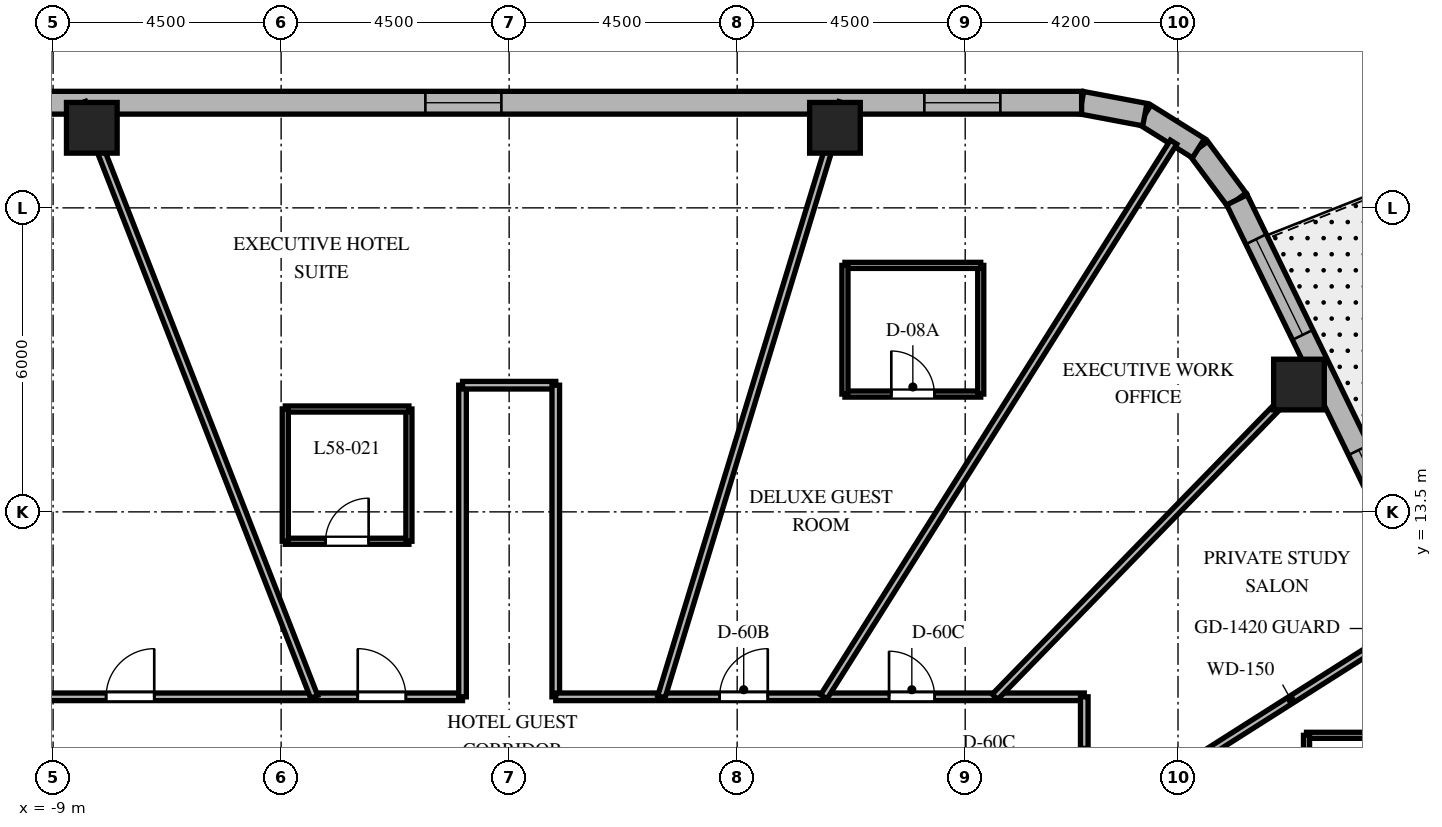
"""IFC4 building model, lengths in metres.
Left out: names, types, materials, properties, quantities, classifications, styles, units other than length and angle.
Written with IfcOpenShell. Run it as: python <this file> out.ifc"""

import sys

from ifc_helpers import new_model, si_unit, direction, frame, frame_2d, origin, origin_2d, place, context, subcontext, project, spatial, rectangle, extrude, element, fill, save


model = new_model("IFC4")
c1 = context("Model", 3, precision=1e-05, world=origin(), true_north=direction((0.0, 1.0)))
c2 = subcontext(c1, "Body", "Model", "MODEL_VIEW")
j1 = project(units=[si_unit("LENGTHUNIT", "METRE"), si_unit("PLANEANGLEUNIT", "RADIAN")], contexts=[c1])
p1 = place(None, origin())
s1 = spatial("IfcSite", under=j1, at=p1, CompositionType="ELEMENT")
p2 = place(p1, origin())
s2 = spatial("IfcBuilding", under=s1, at=p2, CompositionType="ELEMENT")
p3 = place(p2, frame((0.0, 0.0, 233.1)))
s3 = spatial("IfcBuildingStorey", under=s2, at=p3, CompositionType="ELEMENT", Elevation=233.1)
for number, where, z_axis, x_axis in (
    (1, (15.587, 16.013, 0.0), (0.0, 0.0, 1.0), (1.0, 0.0, 0.0)),
    (2, (6.43, 21.08, 0.0), (0.0, 0.0, 1.0), (1.0, 0.0, 0.0)),
    (3, (-8.236, 21.08, 0.0), (0.0, 0.0, 1.0), (1.0, 0.0, 0.0)),
):
    element("IfcColumn", number, at=place(p3, frame(where, z_axis=z_axis, x_axis=x_axis)), inside=s3, PredefinedType="COLUMN", context=c2, shape_type="SweptSolid", body=[
        extrude(rectangle(XDim=1.0, YDim=1.0, at=origin_2d()), origin(), (0.0, 0.0, 1.0), 3.8),
    ])
p4 = place(p3, frame((14.362, 19.658, 0.0), z_axis=(0.0, 0.0, 1.0), x_axis=(-0.596642462792, 0.80250717853, 0.0)))
e4 = element("IfcWall", 4, at=p4, inside=s3, PredefinedType="SOLIDWALL", context=c2, shape_type="SweptSolid", body=[
    extrude(rectangle(XDim=1.27, YDim=0.45, at=frame_2d((0.635, 0.0))), origin(), (0.0, 0.0, 1.0), 3.5),
])
p5 = place(p3, frame((13.604, 20.678, 0.0), z_axis=(0.0, 0.0, 1.0), x_axis=(-0.847910404124, 0.53013955387, 0.0)))
e5 = element("IfcWall", 5, at=p5, inside=s3, PredefinedType="SOLIDWALL", context=c2, shape_type="SweptSolid", body=[
    extrude(rectangle(XDim=1.249, YDim=0.45, at=frame_2d((0.624, 0.0))), origin(), (0.0, 0.0, 1.0), 3.5),
])
p6 = place(p3, frame((12.546, 21.34, 0.0), z_axis=(0.0, 0.0, 1.0), x_axis=(-0.982686750835, 0.18527479519, 0.0)))
e6 = element("IfcWall", 6, at=p6, inside=s3, PredefinedType="SOLIDWALL", context=c2, shape_type="SweptSolid", body=[
    extrude(rectangle(XDim=1.27, YDim=0.45, at=frame_2d((0.635, 0.0))), origin(), (0.0, 0.0, 1.0), 3.5),
])
p7 = place(p3, frame((22.74, 2.452, 0.0), z_axis=(0.0, 0.0, 1.0), x_axis=(-0.437753424814, 0.899095066755, 0.0)))
e7 = element("IfcWall", 7, at=p7, inside=s3, PredefinedType="SOLIDWALL", context=c2, shape_type="SweptSolid", body=[
    extrude(rectangle(XDim=19.137, YDim=0.45, at=frame_2d((9.569, 0.0))), origin(), (0.0, 0.0, 1.0), 3.5),
])
p8 = place(p7, frame((4.763, 0.0, 0.0)))
e8 = element("IfcOpeningElement", 8, at=p8, cuts=e7, PredefinedType="OPENING", context=c2, shape_type="SweptSolid", body=[
    extrude(rectangle(XDim=1.0, YDim=2.15, at=frame_2d((0.5, 1.075))), frame((0.0, 0.235, 0.0), z_axis=(0.0, -1.0, 0.0), x_axis=(1.0, 0.0, 0.0)), (0.0, 0.0, 1.0), 0.47),
])
p9 = place(p7, frame((6.851, 0.0, 0.8)))
e9 = element("IfcOpeningElement", 9, at=p9, cuts=e7, PredefinedType="OPENING", context=c2, shape_type="SweptSolid", body=[
    extrude(rectangle(XDim=2.1, YDim=1.85, at=frame_2d((1.05, 0.925))), frame((0.0, 0.235, 0.0), z_axis=(0.0, -1.0, 0.0), x_axis=(1.0, 0.0, 0.0)), (0.0, 0.0, 1.0), 0.47),
])
p10 = place(p7, frame((11.545, 0.0, 0.8)))
e10 = element("IfcOpeningElement", 10, at=p10, cuts=e7, PredefinedType="OPENING", context=c2, shape_type="SweptSolid", body=[
    extrude(rectangle(XDim=2.1, YDim=1.85, at=frame_2d((1.05, 0.925))), frame((0.0, 0.235, 0.0), z_axis=(0.0, -1.0, 0.0), x_axis=(1.0, 0.0, 0.0)), (0.0, 0.0, 1.0), 0.47),
])
p11 = place(p7, frame((16.173, 0.0, 0.8)))
e11 = element("IfcOpeningElement", 11, at=p11, cuts=e7, PredefinedType="OPENING", context=c2, shape_type="SweptSolid", body=[
    extrude(rectangle(XDim=2.1, YDim=1.85, at=frame_2d((1.05, 0.925))), frame((0.0, 0.235, 0.0), z_axis=(0.0, -1.0, 0.0), x_axis=(1.0, 0.0, 0.0)), (0.0, 0.0, 1.0), 0.47),
])
p12 = place(p7, frame((0.916, 0.0, 0.8)))
e12 = element("IfcOpeningElement", 12, at=p12, cuts=e7, PredefinedType="OPENING", context=c2, shape_type="SweptSolid", body=[
    extrude(rectangle(XDim=2.1, YDim=1.85, at=frame_2d((1.05, 0.925))), frame((0.0, 0.235, 0.0), z_axis=(0.0, -1.0, 0.0), x_axis=(1.0, 0.0, 0.0)), (0.0, 0.0, 1.0), 0.47),
])
p13 = place(p3, frame((11.298, 21.575, 0.0), z_axis=(0.0, 0.0, 1.0), x_axis=(-1.0, 0.0, 0.0)))
e13 = element("IfcWall", 13, at=p13, inside=s3, PredefinedType="SOLIDWALL", context=c2, shape_type="SweptSolid", body=[
    extrude(rectangle(XDim=24.399, YDim=0.45, at=frame_2d((12.2, 0.0))), origin(), (0.0, 0.0, 1.0), 3.5),
])
p14 = place(p13, frame((1.604, 0.0, 0.8)))
e14 = element("IfcOpeningElement", 14, at=p14, cuts=e13, PredefinedType="OPENING", context=c2, shape_type="SweptSolid", body=[
    extrude(rectangle(XDim=1.5, YDim=1.8, at=frame_2d((0.75, 0.9))), frame((0.0, 0.235, 0.0), z_axis=(0.0, -1.0, 0.0), x_axis=(1.0, 0.0, 0.0)), (0.0, 0.0, 1.0), 0.47),
])
p15 = place(p13, frame((11.451, 0.0, 0.8)))
e15 = element("IfcOpeningElement", 15, at=p15, cuts=e13, PredefinedType="OPENING", context=c2, shape_type="SweptSolid", body=[
    extrude(rectangle(XDim=1.5, YDim=1.8, at=frame_2d((0.75, 0.9))), frame((0.0, 0.235, 0.0), z_axis=(0.0, -1.0, 0.0), x_axis=(1.0, 0.0, 0.0)), (0.0, 0.0, 1.0), 0.47),
])
p16 = place(p13, frame((21.296, 0.0, 0.8)))
e16 = element("IfcOpeningElement", 16, at=p16, cuts=e13, PredefinedType="OPENING", context=c2, shape_type="SweptSolid", body=[
    extrude(rectangle(XDim=1.5, YDim=1.8, at=frame_2d((0.75, 0.9))), frame((0.0, 0.235, 0.0), z_axis=(0.0, -1.0, 0.0), x_axis=(1.0, 0.0, 0.0)), (0.0, 0.0, 1.0), 0.47),
])
p17 = place(p3, frame((-11.35, 9.85, 0.0), z_axis=(0.0, 0.0, 1.0), x_axis=(1.0, 0.0, 0.0)))
e17 = element("IfcWall", 17, at=p17, inside=s3, PredefinedType="PARTITIONING", context=c2, shape_type="SweptSolid", body=[
    extrude(rectangle(XDim=10.43, YDim=0.15, at=frame_2d((5.215, 0.0))), origin(), (0.0, 0.0, 1.0), 2.99),
])
p18 = place(p17, frame((8.362, 0.0, 0.0)))
e18 = element("IfcOpeningElement", 18, at=p18, cuts=e17, PredefinedType="OPENING", context=c2, shape_type="SweptSolid", body=[
    extrude(rectangle(XDim=0.95, YDim=2.03, at=frame_2d((0.475, 1.015))), frame((0.0, 0.085, 0.0), z_axis=(0.0, -1.0, 0.0), x_axis=(1.0, 0.0, 0.0)), (0.0, 0.0, 1.0), 0.17),
])
p19 = place(p17, frame((3.396, 0.0, 0.0)))
e19 = element("IfcOpeningElement", 19, at=p19, cuts=e17, PredefinedType="OPENING", context=c2, shape_type="SweptSolid", body=[
    extrude(rectangle(XDim=0.95, YDim=2.03, at=frame_2d((0.475, 1.015))), frame((0.0, 0.085, 0.0), z_axis=(0.0, -1.0, 0.0), x_axis=(1.0, 0.0, 0.0)), (0.0, 0.0, 1.0), 0.17),
])
p20 = place(p3, frame((-0.92, 9.85, 0.0), z_axis=(0.0, 0.0, 1.0), x_axis=(0.0, 1.0, 0.0)))
e20 = element("IfcWall", 20, at=p20, inside=s3, PredefinedType="PARTITIONING", context=c2, shape_type="SweptSolid", body=[
    extrude(rectangle(XDim=6.15, YDim=0.15, at=frame_2d((3.075, 0.0))), origin(), (0.0, 0.0, 1.0), 3.026),
])
p21 = place(p3, frame((-0.92, 16.0, 0.0), z_axis=(0.0, 0.0, 1.0), x_axis=(1.0, 0.0, 0.0)))
e21 = element("IfcWall", 21, at=p21, inside=s3, PredefinedType="PARTITIONING", context=c2, shape_type="SweptSolid", body=[
    extrude(rectangle(XDim=1.84, YDim=0.15, at=frame_2d((0.92, 0.0))), origin(), (0.0, 0.0, 1.0), 3.5),
])
p22 = place(p3, frame((0.92, 16.0, 0.0), z_axis=(0.0, 0.0, 1.0), x_axis=(0.0, -1.0, 0.0)))
e22 = element("IfcWall", 22, at=p22, inside=s3, PredefinedType="PARTITIONING", context=c2, shape_type="SweptSolid", body=[
    extrude(rectangle(XDim=6.15, YDim=0.15, at=frame_2d((3.075, 0.0))), origin(), (0.0, 0.0, 1.0), 3.026),
])
p23 = place(p3, frame((0.92, 9.85, 0.0), z_axis=(0.0, 0.0, 1.0), x_axis=(1.0, 0.0, 0.0)))
e23 = element("IfcWall", 23, at=p23, inside=s3, PredefinedType="PARTITIONING", context=c2, shape_type="SweptSolid", body=[
    extrude(rectangle(XDim=10.43, YDim=0.15, at=frame_2d((5.215, 0.0))), origin(), (0.0, 0.0, 1.0), 2.99),
])
p24 = place(p23, frame((6.577, 0.0, 0.0)))
e24 = element("IfcOpeningElement", 24, at=p24, cuts=e23, PredefinedType="OPENING", context=c2, shape_type="SweptSolid", body=[
    extrude(rectangle(XDim=0.9, YDim=2.03, at=frame_2d((0.45, 1.015))), frame((0.0, 0.085, 0.0), z_axis=(0.0, -1.0, 0.0), x_axis=(1.0, 0.0, 0.0)), (0.0, 0.0, 1.0), 0.17),
])
p25 = place(p23, frame((3.234, 0.0, 0.0)))
e25 = element("IfcOpeningElement", 25, at=p25, cuts=e23, PredefinedType="OPENING", context=c2, shape_type="SweptSolid", body=[
    extrude(rectangle(XDim=0.95, YDim=2.03, at=frame_2d((0.475, 1.015))), frame((0.0, 0.085, 0.0), z_axis=(0.0, -1.0, 0.0), x_axis=(1.0, 0.0, 0.0)), (0.0, 0.0, 1.0), 0.17),
])
p26 = place(p3, frame((11.35, 9.85, 0.0), z_axis=(0.0, 0.0, 1.0), x_axis=(0.0, -1.0, 0.0)))
e26 = element("IfcWall", 26, at=p26, inside=s3, PredefinedType="PARTITIONING", context=c2, shape_type="SweptSolid", body=[
    extrude(rectangle(XDim=12.4, YDim=0.15, at=frame_2d((6.2, 0.0))), origin(), (0.0, 0.0, 1.0), 2.99),
])
p27 = place(p26, frame((4.191, 0.0, 0.0)))
e27 = element("IfcOpeningElement", 27, at=p27, cuts=e26, PredefinedType="OPENING", context=c2, shape_type="SweptSolid", body=[
    extrude(rectangle(XDim=0.95, YDim=2.03, at=frame_2d((0.475, 1.015))), frame((0.0, 0.085, 0.0), z_axis=(0.0, -1.0, 0.0), x_axis=(1.0, 0.0, 0.0)), (0.0, 0.0, 1.0), 0.17),
])
p28 = place(p26, frame((0.994, 0.0, 0.0)))
e28 = element("IfcOpeningElement", 28, at=p28, cuts=e26, PredefinedType="OPENING", context=c2, shape_type="SweptSolid", body=[
    extrude(rectangle(XDim=0.9, YDim=2.03, at=frame_2d((0.45, 1.015))), frame((0.0, 0.085, 0.0), z_axis=(0.0, -1.0, 0.0), x_axis=(1.0, 0.0, 0.0)), (0.0, 0.0, 1.0), 0.17),
])
p29 = place(p26, frame((8.835, 0.0, 0.0)))
e29 = element("IfcOpeningElement", 29, at=p29, cuts=e26, PredefinedType="OPENING", context=c2, shape_type="SweptSolid", body=[
    extrude(rectangle(XDim=0.95, YDim=2.03, at=frame_2d((0.475, 1.015))), frame((0.0, 0.085, 0.0), z_axis=(0.0, -1.0, 0.0), x_axis=(1.0, 0.0, 0.0)), (0.0, 0.0, 1.0), 0.17),
])
p30 = place(p3, frame((11.35, 7.202, 0.0), z_axis=(0.0, 0.0, 1.0), x_axis=(0.844364592263, 0.535769013039, 0.0)))
e30 = element("IfcWall", 30, at=p30, inside=s3, PredefinedType="PARTITIONING", context=c2, shape_type="SweptSolid", body=[
    extrude(rectangle(XDim=8.213, YDim=0.15, at=frame_2d((4.106, 0.0))), origin(), (0.0, 0.0, 1.0), 2.74),
])
p31 = place(p3, frame((9.588, 9.85, 0.0), z_axis=(0.0, 0.0, 1.0), x_axis=(0.697519469595, 0.716565830567, 0.0)))
e31 = element("IfcWall", 31, at=p31, inside=s3, PredefinedType="PARTITIONING", context=c2, shape_type="SweptSolid", body=[
    extrude(rectangle(XDim=9.126, YDim=0.15, at=frame_2d((4.563, 0.0))), origin(), (0.0, 0.0, 1.0), 2.74),
])
p32 = place(p3, frame((6.21, 9.85, 0.0), z_axis=(0.0, 0.0, 1.0), x_axis=(0.533335553786, 0.84590376939, 0.0)))
e32 = element("IfcWall", 32, at=p32, inside=s3, PredefinedType="PARTITIONING", context=c2, shape_type="SweptSolid", body=[
    extrude(rectangle(XDim=12.941, YDim=0.15, at=frame_2d((6.47, 0.0))), origin(), (0.0, 0.0, 1.0), 2.74),
])
p33 = place(p3, frame((3.004, 9.85, 0.0), z_axis=(0.0, 0.0, 1.0), x_axis=(0.291775760688, 0.956486751333, 0.0)))
e33 = element("IfcWall", 33, at=p33, inside=s3, PredefinedType="PARTITIONING", context=c2, shape_type="SweptSolid", body=[
    extrude(rectangle(XDim=12.258, YDim=0.15, at=frame_2d((6.129, 0.0))), origin(), (0.0, 0.0, 1.0), 2.74),
])
p34 = place(p3, frame((-3.848, 9.85, 0.0), z_axis=(0.0, 0.0, 1.0), x_axis=(-0.363921778212, 0.931429513889, 0.0)))
e34 = element("IfcWall", 34, at=p34, inside=s3, PredefinedType="PARTITIONING", context=c2, shape_type="SweptSolid", body=[
    extrude(rectangle(XDim=12.588, YDim=0.15, at=frame_2d((6.294, 0.0))), origin(), (0.0, 0.0, 1.0), 2.74),
])
p35 = place(p3, frame((18.176, 9.09, 0.0), z_axis=(0.0, 0.0, 1.0), x_axis=(-1.0, 0.0, 0.0)))
e35 = element("IfcWall", 35, at=p35, inside=s3, PredefinedType="PARTITIONING", context=c2, shape_type="SweptSolid", body=[
    extrude(rectangle(XDim=2.44, YDim=0.12, at=frame_2d((1.22, 0.0))), origin(), (0.0, 0.0, 1.0), 3.5),
])
p36 = place(p3, frame((15.736, 9.09, 0.0), z_axis=(0.0, 0.0, 1.0), x_axis=(0.0, -1.0, 0.0)))
e36 = element("IfcWall", 36, at=p36, inside=s3, PredefinedType="PARTITIONING", context=c2, shape_type="SweptSolid", body=[
    extrude(rectangle(XDim=2.61, YDim=0.12, at=frame_2d((1.305, 0.0))), origin(), (0.0, 0.0, 1.0), 2.99),
])
p37 = place(p3, frame((6.627, 15.825, 0.0), z_axis=(0.0, 0.0, 1.0), x_axis=(1.0, 0.0, 0.0)))
e37 = element("IfcWall", 37, at=p37, inside=s3, PredefinedType="PARTITIONING", context=c2, shape_type="SweptSolid", body=[
    extrude(rectangle(XDim=2.68, YDim=0.12, at=frame_2d((1.34, 0.0))), origin(), (0.0, 0.0, 1.0), 3.072),
])
p38 = place(p37, frame((0.915, 0.0, 0.0)))
e38 = element("IfcOpeningElement", 38, at=p38, cuts=e37, PredefinedType="OPENING", context=c2, shape_type="SweptSolid", body=[
    extrude(rectangle(XDim=0.85, YDim=2.03, at=frame_2d((0.425, 1.015))), frame((0.0, 0.07, 0.0), z_axis=(0.0, -1.0, 0.0), x_axis=(1.0, 0.0, 0.0)), (0.0, 0.0, 1.0), 0.14),
])
p39 = place(p3, frame((9.307, 15.825, 0.0), z_axis=(0.0, 0.0, 1.0), x_axis=(0.0, 1.0, 0.0)))
e39 = element("IfcWall", 39, at=p39, inside=s3, PredefinedType="PARTITIONING", context=c2, shape_type="SweptSolid", body=[
    extrude(rectangle(XDim=2.54, YDim=0.12, at=frame_2d((1.27, 0.0))), origin(), (0.0, 0.0, 1.0), 3.5),
])
p40 = place(p3, frame((9.307, 18.365, 0.0), z_axis=(0.0, 0.0, 1.0), x_axis=(-1.0, 0.0, 0.0)))
e40 = element("IfcWall", 40, at=p40, inside=s3, PredefinedType="PARTITIONING", context=c2, shape_type="SweptSolid", body=[
    extrude(rectangle(XDim=2.68, YDim=0.12, at=frame_2d((1.34, 0.0))), origin(), (0.0, 0.0, 1.0), 3.5),
])
p41 = place(p3, frame((6.627, 18.365, 0.0), z_axis=(0.0, 0.0, 1.0), x_axis=(0.0, -1.0, 0.0)))
e41 = element("IfcWall", 41, at=p41, inside=s3, PredefinedType="PARTITIONING", context=c2, shape_type="SweptSolid", body=[
    extrude(rectangle(XDim=2.54, YDim=0.12, at=frame_2d((1.27, 0.0))), origin(), (0.0, 0.0, 1.0), 3.072),
])
p42 = place(p3, frame((-4.418, 12.92, 0.0), z_axis=(0.0, 0.0, 1.0), x_axis=(1.0, 0.0, 0.0)))
e42 = element("IfcWall", 42, at=p42, inside=s3, PredefinedType="PARTITIONING", context=c2, shape_type="SweptSolid", body=[
    extrude(rectangle(XDim=2.44, YDim=0.12, at=frame_2d((1.22, 0.0))), origin(), (0.0, 0.0, 1.0), 3.5),
])
p43 = place(p42, frame((0.795, 0.0, 0.0)))
e43 = element("IfcOpeningElement", 43, at=p43, cuts=e42, PredefinedType="OPENING", context=c2, shape_type="SweptSolid", body=[
    extrude(rectangle(XDim=0.85, YDim=2.03, at=frame_2d((0.425, 1.015))), frame((0.0, 0.07, 0.0), z_axis=(0.0, -1.0, 0.0), x_axis=(1.0, 0.0, 0.0)), (0.0, 0.0, 1.0), 0.14),
])
p44 = place(p3, frame((-1.978, 12.92, 0.0), z_axis=(0.0, 0.0, 1.0), x_axis=(0.0, 1.0, 0.0)))
e44 = element("IfcWall", 44, at=p44, inside=s3, PredefinedType="PARTITIONING", context=c2, shape_type="SweptSolid", body=[
    extrude(rectangle(XDim=2.61, YDim=0.12, at=frame_2d((1.305, 0.0))), origin(), (0.0, 0.0, 1.0), 3.026),
])
p45 = place(p3, frame((-1.978, 15.53, 0.0), z_axis=(0.0, 0.0, 1.0), x_axis=(-1.0, 0.0, 0.0)))
e45 = element("IfcWall", 45, at=p45, inside=s3, PredefinedType="PARTITIONING", context=c2, shape_type="SweptSolid", body=[
    extrude(rectangle(XDim=2.44, YDim=0.12, at=frame_2d((1.22, 0.0))), origin(), (0.0, 0.0, 1.0), 3.5),
])
p46 = place(p3, frame((-4.418, 15.53, 0.0), z_axis=(0.0, 0.0, 1.0), x_axis=(0.0, -1.0, 0.0)))
e46 = element("IfcWall", 46, at=p46, inside=s3, PredefinedType="PARTITIONING", context=c2, shape_type="SweptSolid", body=[
    extrude(rectangle(XDim=2.61, YDim=0.12, at=frame_2d((1.305, 0.0))), origin(), (0.0, 0.0, 1.0), 3.026),
])
p47 = place(p10, origin())
e47 = element("IfcWindow", 47, at=p47, inside=s3, PartitioningType="SINGLE_PANEL", PredefinedType="WINDOW", context=c2, shape_type="SweptSolid", body=[
    extrude(rectangle(XDim=2.1, YDim=1.85, at=frame_2d((1.05, 0.925))), frame((0.0, 0.03, 0.0), z_axis=(0.0, -1.0, 0.0), x_axis=(1.0, 0.0, 0.0)), (0.0, 0.0, 1.0), 0.06),
])
fill(e10, e47)
p48 = place(p11, origin())
e48 = element("IfcWindow", 48, at=p48, inside=s3, PartitioningType="SINGLE_PANEL", PredefinedType="WINDOW", context=c2, shape_type="SweptSolid", body=[
    extrude(rectangle(XDim=2.1, YDim=1.85, at=frame_2d((1.05, 0.925))), frame((0.0, 0.03, 0.0), z_axis=(0.0, -1.0, 0.0), x_axis=(1.0, 0.0, 0.0)), (0.0, 0.0, 1.0), 0.06),
])
fill(e11, e48)
p49 = place(p14, origin())
e49 = element("IfcWindow", 49, at=p49, inside=s3, PartitioningType="SINGLE_PANEL", PredefinedType="WINDOW", context=c2, shape_type="SweptSolid", body=[
    extrude(rectangle(XDim=1.5, YDim=1.8, at=frame_2d((0.75, 0.9))), frame((0.0, 0.03, 0.0), z_axis=(0.0, -1.0, 0.0), x_axis=(1.0, 0.0, 0.0)), (0.0, 0.0, 1.0), 0.06),
])
fill(e14, e49)
p50 = place(p15, origin())
e50 = element("IfcWindow", 50, at=p50, inside=s3, PartitioningType="SINGLE_PANEL", PredefinedType="WINDOW", context=c2, shape_type="SweptSolid", body=[
    extrude(rectangle(XDim=1.5, YDim=1.8, at=frame_2d((0.75, 0.9))), frame((0.0, 0.03, 0.0), z_axis=(0.0, -1.0, 0.0), x_axis=(1.0, 0.0, 0.0)), (0.0, 0.0, 1.0), 0.06),
])
fill(e15, e50)
p51 = place(p28, origin())
e51 = element("IfcDoor", 51, at=p51, inside=s3, OperationType="SINGLE_SWING_RIGHT", PredefinedType="DOOR", context=c2, shape_type="SweptSolid", body=[
    extrude(rectangle(XDim=0.9, YDim=2.03, at=frame_2d((0.45, 1.015))), frame((0.0, 0.025, 0.0), z_axis=(0.0, -1.0, 0.0), x_axis=(1.0, 0.0, 0.0)), (0.0, 0.0, 1.0), 0.05),
])
fill(e28, e51)
p52 = place(p24, origin())
e52 = element("IfcDoor", 52, at=p52, inside=s3, OperationType="SINGLE_SWING_LEFT", PredefinedType="DOOR", context=c2, shape_type="SweptSolid", body=[
    extrude(rectangle(XDim=0.9, YDim=2.03, at=frame_2d((0.45, 1.015))), frame((0.0, 0.025, 0.0), z_axis=(0.0, -1.0, 0.0), x_axis=(1.0, 0.0, 0.0)), (0.0, 0.0, 1.0), 0.05),
])
fill(e24, e52)
p53 = place(p25, origin())
e53 = element("IfcDoor", 53, at=p53, inside=s3, OperationType="SINGLE_SWING_RIGHT", PredefinedType="DOOR", context=c2, shape_type="SweptSolid", body=[
    extrude(rectangle(XDim=0.95, YDim=2.03, at=frame_2d((0.475, 1.015))), frame((0.0, 0.025, 0.0), z_axis=(0.0, -1.0, 0.0), x_axis=(1.0, 0.0, 0.0)), (0.0, 0.0, 1.0), 0.05),
])
fill(e25, e53)
p54 = place(p38, origin())
e54 = element("IfcDoor", 54, at=p54, inside=s3, OperationType="SINGLE_SWING_LEFT", PredefinedType="DOOR", context=c2, shape_type="SweptSolid", body=[
    extrude(rectangle(XDim=0.85, YDim=2.03, at=frame_2d((0.425, 1.015))), frame((0.0, 0.025, 0.0), z_axis=(0.0, -1.0, 0.0), x_axis=(1.0, 0.0, 0.0)), (0.0, 0.0, 1.0), 0.05),
])
fill(e38, e54)
p55 = place(p18, origin())
e55 = element("IfcDoor", 55, at=p55, inside=s3, OperationType="SINGLE_SWING_LEFT", PredefinedType="DOOR", context=c2, shape_type="SweptSolid", body=[
    extrude(rectangle(XDim=0.95, YDim=2.03, at=frame_2d((0.475, 1.015))), frame((0.0, 0.025, 0.0), z_axis=(0.0, -1.0, 0.0), x_axis=(1.0, 0.0, 0.0)), (0.0, 0.0, 1.0), 0.05),
])
fill(e18, e55)
p56 = place(p43, origin())
e56 = element("IfcDoor", 56, at=p56, inside=s3, OperationType="SINGLE_SWING_RIGHT", PredefinedType="DOOR", context=c2, shape_type="SweptSolid", body=[
    extrude(rectangle(XDim=0.85, YDim=2.03, at=frame_2d((0.425, 1.015))), frame((0.0, 0.025, 0.0), z_axis=(0.0, -1.0, 0.0), x_axis=(1.0, 0.0, 0.0)), (0.0, 0.0, 1.0), 0.05),
])
fill(e43, e56)
p57 = place(p19, origin())
e57 = element("IfcDoor", 57, at=p57, inside=s3, OperationType="SINGLE_SWING_RIGHT", PredefinedType="DOOR", context=c2, shape_type="SweptSolid", body=[
    extrude(rectangle(XDim=0.95, YDim=2.03, at=frame_2d((0.475, 1.015))), frame((0.0, 0.025, 0.0), z_axis=(0.0, -1.0, 0.0), x_axis=(1.0, 0.0, 0.0)), (0.0, 0.0, 1.0), 0.05),
])
fill(e19, e57)
save(model, sys.argv[1])
